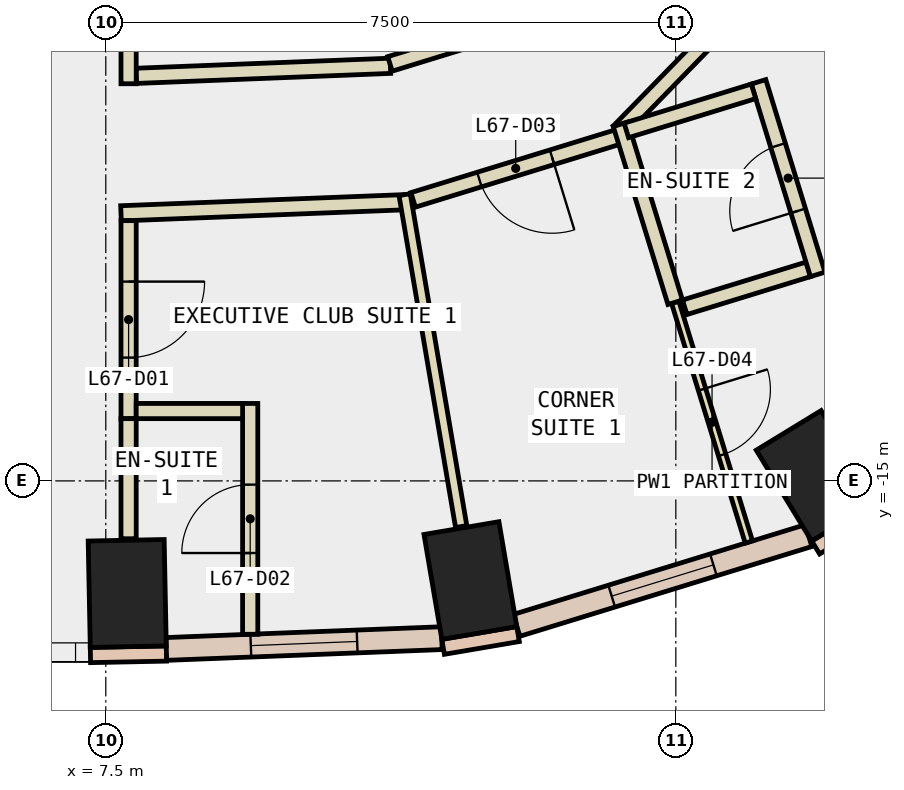
"""IFC4 building model, lengths in metres.
Left out: names, types, materials, properties, quantities, classifications, styles, units other than length and angle.
Written with IfcOpenShell. Run it as: python <this file> out.ifc"""

import sys

from ifc_helpers import new_model, si_unit, direction, frame, frame_2d, origin, origin_2d, place, context, subcontext, project, spatial, rectangle, extrude, element, fill, save


model = new_model("IFC4")
c1 = context("Model", 3, precision=1e-05, world=origin(), true_north=direction((0.0, 1.0)))
c2 = subcontext(c1, "Body", "Model", "MODEL_VIEW")
j1 = project(units=[si_unit("LENGTHUNIT", "METRE"), si_unit("PLANEANGLEUNIT", "RADIAN")], contexts=[c1])
p1 = place(None, origin())
s1 = spatial("IfcSite", under=j1, at=p1, CompositionType="ELEMENT")
p2 = place(p1, origin())
s2 = spatial("IfcBuilding", under=s1, at=p2, CompositionType="ELEMENT")
p3 = place(p2, frame((0.0, 0.0, 290.0)))
s3 = spatial("IfcBuildingStorey", under=s2, at=p3, CompositionType="ELEMENT", Elevation=290.0)
for number, where, z_axis, x_axis in (
    (1, (7.782, -16.481, -0.34), (0.0, 0.0, 1.0), (1.0, 0.02, 0.0)),
    (2, (12.297, -16.311, -0.34), (0.0, 0.0, 1.0), (0.986, 0.168, 0.0)),
    (3, (16.85, -14.933, -0.34), (0.0, 0.0, 1.0), (0.854, 0.521, 0.0)),
):
    element("IfcColumn", number, at=place(p3, frame(where, z_axis=z_axis, x_axis=x_axis)), inside=s3, PredefinedType="COLUMN", context=c2, shape_type="SweptSolid", body=[
        extrude(rectangle(XDim=1.0, YDim=1.4, at=origin_2d()), origin(), (0.0, 0.0, 1.0), 3.6),
    ])
for number, where, z_axis, x_axis in (
    (4, (7.298, -17.291, 0.0), (0.0, 0.0, 1.0), (1.0, 0.02, 0.0)),
    (5, (11.938, -17.183, 0.0), (0.0, 0.0, 1.0), (0.986, 0.168, 0.0)),
):
    element("IfcWall", number, at=place(p3, frame(where, z_axis=z_axis, x_axis=x_axis)), inside=s3, PredefinedType="STANDARD", context=c2, shape_type="SweptSolid", body=[
        extrude(rectangle(XDim=1.0, YDim=0.2, at=frame_2d((0.5, 0.0))), origin(), (0.0, 0.0, 1.0), 3.26),
    ])
p4 = place(p3, frame((16.84, -15.876, 0.0), z_axis=(0.0, 0.0, 1.0), x_axis=(0.853679739553, 0.520798331677, 0.0)))
e6 = element("IfcWall", 6, at=p4, inside=s3, PredefinedType="STANDARD", context=c2, shape_type="SweptSolid", body=[
    extrude(rectangle(XDim=1.0, YDim=0.2, at=frame_2d((0.5, 0.0))), origin(), (0.0, 0.0, 1.0), 3.26),
])
p5 = place(p3, frame((8.296, -17.211, 0.0), z_axis=(0.0, 0.0, 1.0), x_axis=(0.999234893779, 0.039110446866, 0.0)))
e7 = element("IfcWall", 7, at=p5, inside=s3, PredefinedType="STANDARD", context=c2, shape_type="SweptSolid", body=[
    extrude(rectangle(XDim=3.627, YDim=0.3, at=frame_2d((1.813, 0.0))), origin(), (0.0, 0.0, 1.0), 3.26),
])
p6 = place(p5, frame((1.113, 0.0, 0.9)))
e8 = element("IfcOpeningElement", 8, at=p6, cuts=e7, PredefinedType="OPENING", context=c2, shape_type="SweptSolid", body=[
    extrude(rectangle(XDim=1.4, YDim=2.0, at=frame_2d((0.7, 1.0))), frame((0.0, 0.16, 0.0), z_axis=(0.0, -1.0, 0.0), x_axis=(1.0, 0.0, 0.0)), (0.0, 0.0, 1.0), 0.32),
])
p7 = place(p3, frame((12.904, -16.901, 0.0), z_axis=(0.0, 0.0, 1.0), x_axis=(0.955866957005, 0.293799864716, 0.0)))
e9 = element("IfcWall", 9, at=p7, inside=s3, PredefinedType="STANDARD", context=c2, shape_type="SweptSolid", body=[
    extrude(rectangle(XDim=4.02, YDim=0.3, at=frame_2d((2.01, 0.0))), origin(), (0.0, 0.0, 1.0), 3.26),
])
p8 = place(p7, frame((1.31, 0.0, 0.9)))
e10 = element("IfcOpeningElement", 10, at=p8, cuts=e9, PredefinedType="OPENING", context=c2, shape_type="SweptSolid", body=[
    extrude(rectangle(XDim=1.4, YDim=2.0, at=frame_2d((0.7, 1.0))), frame((0.0, 0.16, 0.0), z_axis=(0.0, -1.0, 0.0), x_axis=(1.0, 0.0, 0.0)), (0.0, 0.0, 1.0), 0.32),
])
p9 = place(p3, frame((7.9, -9.671, 0.0), z_axis=(0.0, 0.0, 1.0), x_axis=(0.999223751627, 0.039394088186, 0.0)))
e11 = element("IfcWall", 11, at=p9, inside=s3, PredefinedType="PARTITIONING", context=c2, shape_type="SweptSolid", body=[
    extrude(rectangle(XDim=3.347, YDim=0.2, at=frame_2d((1.673, 0.0))), origin(), (0.0, 0.0, 1.0), 3.26),
])
p10 = place(p3, frame((11.239, -9.514, 0.0), z_axis=(0.0, 0.0, 1.0), x_axis=(0.955838469047, 0.293892533234, 0.0)))
e12 = element("IfcWall", 12, at=p10, inside=s3, PredefinedType="PARTITIONING", context=c2, shape_type="SweptSolid", body=[
    extrude(rectangle(XDim=2.13, YDim=0.2, at=frame_2d((1.065, 0.0))), origin(), (0.0, 0.0, 1.0), 3.26),
])
p11 = place(p3, frame((11.474, -11.332, 0.0), z_axis=(0.0, 0.0, 1.0), x_axis=(-0.999232546126, -0.039170381199, 0.0)))
e13 = element("IfcWall", 13, at=p11, inside=s3, PredefinedType="PARTITIONING", context=c2, shape_type="SweptSolid", body=[
    extrude(rectangle(XDim=3.777, YDim=0.2, at=frame_2d((1.889, 0.0))), origin(), (0.0, 0.0, 1.0), 3.26),
])
p12 = place(p3, frame((14.243, -10.474, 0.0), z_axis=(0.0, 0.0, 1.0), x_axis=(-0.955937788993, -0.293569316475, 0.0)))
e14 = element("IfcWall", 14, at=p12, inside=s3, PredefinedType="PARTITIONING", context=c2, shape_type="SweptSolid", body=[
    extrude(rectangle(XDim=2.823, YDim=0.2, at=frame_2d((1.412, 0.0))), origin(), (0.0, 0.0, 1.0), 3.26),
])
p13 = place(p12, frame((0.912, 0.0, 0.0)))
e15 = element("IfcOpeningElement", 15, at=p13, cuts=e14, PredefinedType="OPENING", context=c2, shape_type="SweptSolid", body=[
    extrude(rectangle(XDim=1.0, YDim=2.1, at=frame_2d((0.5, 1.05))), frame((0.0, 0.11, 0.0), z_axis=(0.0, -1.0, 0.0), x_axis=(1.0, 0.0, 0.0)), (0.0, 0.0, 1.0), 0.22),
])
p14 = place(p3, frame((15.535, -9.081, 0.0), z_axis=(0.0, 0.0, 1.0), x_axis=(-0.698342132704, -0.715764113162, 0.0)))
e16 = element("IfcWall", 16, at=p14, inside=s3, PredefinedType="PARTITIONING", context=c2, shape_type="SweptSolid", body=[
    extrude(rectangle(XDim=1.836, YDim=0.2, at=frame_2d((0.918, 0.0))), origin(), (0.0, 0.0, 1.0), 3.26),
])
p15 = place(p3, frame((7.8, -5.899, 0.0), z_axis=(0.0, 0.0, 1.0), x_axis=(0.0, -1.0, 0.0)))
e17 = element("IfcWall", 17, at=p15, inside=s3, PredefinedType="PARTITIONING", context=c2, shape_type="SweptSolid", body=[
    extrude(rectangle(XDim=3.876, YDim=0.2, at=frame_2d((1.938, 0.0))), origin(), (0.0, 0.0, 1.0), 3.26),
])
p16 = place(p3, frame((7.8, -11.576, 0.0), z_axis=(0.0, 0.0, 1.0), x_axis=(0.0, -1.0, 0.0)))
e18 = element("IfcWall", 18, at=p16, inside=s3, PredefinedType="PARTITIONING", context=c2, shape_type="SweptSolid", body=[
    extrude(rectangle(XDim=2.605, YDim=0.2, at=frame_2d((1.302, 0.0))), origin(), (0.0, 0.0, 1.0), 3.26),
])
p17 = place(p16, frame((0.802, 0.0, 0.0)))
e19 = element("IfcOpeningElement", 19, at=p17, cuts=e18, PredefinedType="OPENING", context=c2, shape_type="SweptSolid", body=[
    extrude(rectangle(XDim=1.0, YDim=2.1, at=frame_2d((0.5, 1.05))), frame((0.0, 0.11, 0.0), z_axis=(0.0, -1.0, 0.0), x_axis=(1.0, 0.0, 0.0)), (0.0, 0.0, 1.0), 0.22),
])
p18 = place(p3, frame((7.8, -14.181, 0.0), z_axis=(0.0, 0.0, 1.0), x_axis=(0.0, -1.0, 0.0)))
e20 = element("IfcWall", 20, at=p18, inside=s3, PredefinedType="PARTITIONING", context=c2, shape_type="SweptSolid", body=[
    extrude(rectangle(XDim=1.58, YDim=0.2, at=frame_2d((0.79, 0.0))), origin(), (0.0, 0.0, 1.0), 3.26),
])
p19 = place(p3, frame((9.4, -17.018, 0.0), z_axis=(0.0, 0.0, 1.0), x_axis=(0.0, 1.0, 0.0)))
e21 = element("IfcWall", 21, at=p19, inside=s3, PredefinedType="PARTITIONING", context=c2, shape_type="SweptSolid", body=[
    extrude(rectangle(XDim=3.037, YDim=0.2, at=frame_2d((1.519, 0.0))), origin(), (0.0, 0.0, 1.0), 3.26),
])
p20 = place(p19, frame((1.069, 0.0, 0.0)))
e22 = element("IfcOpeningElement", 22, at=p20, cuts=e21, PredefinedType="OPENING", context=c2, shape_type="SweptSolid", body=[
    extrude(rectangle(XDim=0.9, YDim=2.1, at=frame_2d((0.45, 1.05))), frame((0.0, 0.11, 0.0), z_axis=(0.0, -1.0, 0.0), x_axis=(1.0, 0.0, 0.0)), (0.0, 0.0, 1.0), 0.22),
])
p21 = place(p3, frame((9.3, -14.081, 0.0), z_axis=(0.0, 0.0, 1.0), x_axis=(-1.0, 0.0, 0.0)))
e23 = element("IfcWall", 23, at=p21, inside=s3, PredefinedType="PARTITIONING", context=c2, shape_type="SweptSolid", body=[
    extrude(rectangle(XDim=1.4, YDim=0.2, at=frame_2d((0.7, 0.0))), origin(), (0.0, 0.0, 1.0), 3.26),
])
p22 = place(p3, frame((11.432, -11.234, 0.0), z_axis=(0.0, 0.0, 1.0), x_axis=(0.16797255243, -0.98579167253, 0.0)))
e24 = element("IfcWall", 24, at=p22, inside=s3, PredefinedType="PARTITIONING", context=c2, shape_type="SweptSolid", body=[
    extrude(rectangle(XDim=4.43, YDim=0.15, at=frame_2d((2.215, 0.0))), origin(), (0.0, 0.0, 1.0), 3.26),
])
p23 = place(p3, frame((14.992, -12.65, 0.0), z_axis=(0.0, 0.0, 1.0), x_axis=(0.293675064948, -0.955905307145, 0.0)))
e25 = element("IfcWall", 25, at=p23, inside=s3, PredefinedType="PARTITIONING", context=c2, shape_type="SweptSolid", body=[
    extrude(rectangle(XDim=3.3, YDim=0.1, at=frame_2d((1.65, 0.0))), origin(), (0.0, 0.0, 1.0), 3.26),
])
p24 = place(p23, frame((1.2, 0.0, 0.0)))
e26 = element("IfcOpeningElement", 26, at=p24, cuts=e25, PredefinedType="OPENING", context=c2, shape_type="SweptSolid", body=[
    extrude(rectangle(XDim=0.9, YDim=2.1, at=frame_2d((0.45, 1.05))), frame((0.0, 0.06, 0.0), z_axis=(0.0, -1.0, 0.0), x_axis=(1.0, 0.0, 0.0)), (0.0, 0.0, 1.0), 0.12),
])
p25 = place(p3, frame((14.272, -10.308, 0.0), z_axis=(0.0, 0.0, 1.0), x_axis=(0.293868765171, -0.955845776711, 0.0)))
e27 = element("IfcWall", 27, at=p25, inside=s3, PredefinedType="PARTITIONING", context=c2, shape_type="SweptSolid", body=[
    extrude(rectangle(XDim=2.45, YDim=0.2, at=frame_2d((1.225, 0.0))), origin(), (0.0, 0.0, 1.0), 3.26),
])
p26 = place(p3, frame((15.117, -12.716, 0.0), z_axis=(0.0, 0.0, 1.0), x_axis=(0.955940341053, 0.293561006177, 0.0)))
e28 = element("IfcWall", 28, at=p26, inside=s3, PredefinedType="PARTITIONING", context=c2, shape_type="SweptSolid", body=[
    extrude(rectangle(XDim=1.7, YDim=0.2, at=frame_2d((0.85, 0.0))), origin(), (0.0, 0.0, 1.0), 3.26),
])
p27 = place(p3, frame((16.867, -12.283, 0.0), z_axis=(0.0, 0.0, 1.0), x_axis=(-0.29397579302, 0.955812865114, 0.0)))
e29 = element("IfcWall", 29, at=p27, inside=s3, PredefinedType="PARTITIONING", context=c2, shape_type="SweptSolid", body=[
    extrude(rectangle(XDim=2.65, YDim=0.2, at=frame_2d((1.325, 0.0))), origin(), (0.0, 0.0, 1.0), 3.26),
])
p28 = place(p27, frame((0.875, 0.0, 0.0)))
e30 = element("IfcOpeningElement", 30, at=p28, cuts=e29, PredefinedType="OPENING", context=c2, shape_type="SweptSolid", body=[
    extrude(rectangle(XDim=0.9, YDim=2.1, at=frame_2d((0.45, 1.05))), frame((0.0, 0.11, 0.0), z_axis=(0.0, -1.0, 0.0), x_axis=(1.0, 0.0, 0.0)), (0.0, 0.0, 1.0), 0.22),
])
p29 = place(p3, frame((16.022, -9.875, 0.0), z_axis=(0.0, 0.0, 1.0), x_axis=(-0.955908620472, -0.293664279932, 0.0)))
e31 = element("IfcWall", 31, at=p29, inside=s3, PredefinedType="PARTITIONING", context=c2, shape_type="SweptSolid", body=[
    extrude(rectangle(XDim=1.75, YDim=0.2, at=frame_2d((0.875, 0.0))), origin(), (0.0, 0.0, 1.0), 3.26),
])
p30 = place(p6, origin())
e32 = element("IfcWindow", 32, at=p30, inside=s3, PartitioningType="SINGLE_PANEL", PredefinedType="WINDOW", context=c2, shape_type="SweptSolid", body=[
    extrude(rectangle(XDim=1.4, YDim=2.0, at=frame_2d((0.7, 1.0))), frame((0.0, 0.03, 0.0), z_axis=(0.0, -1.0, 0.0), x_axis=(1.0, 0.0, 0.0)), (0.0, 0.0, 1.0), 0.06),
])
fill(e8, e32)
p31 = place(p8, origin())
e33 = element("IfcWindow", 33, at=p31, inside=s3, PartitioningType="SINGLE_PANEL", PredefinedType="WINDOW", context=c2, shape_type="SweptSolid", body=[
    extrude(rectangle(XDim=1.4, YDim=2.0, at=frame_2d((0.7, 1.0))), frame((0.0, 0.03, 0.0), z_axis=(0.0, -1.0, 0.0), x_axis=(1.0, 0.0, 0.0)), (0.0, 0.0, 1.0), 0.06),
])
fill(e10, e33)
p32 = place(p17, origin())
e34 = element("IfcDoor", 34, at=p32, inside=s3, OperationType="SINGLE_SWING_LEFT", PredefinedType="DOOR", context=c2, shape_type="SweptSolid", body=[
    extrude(rectangle(XDim=1.0, YDim=2.1, at=frame_2d((0.5, 1.05))), frame((0.0, 0.025, 0.0), z_axis=(0.0, -1.0, 0.0), x_axis=(1.0, 0.0, 0.0)), (0.0, 0.0, 1.0), 0.05),
])
fill(e19, e34)
p33 = place(p20, origin())
e35 = element("IfcDoor", 35, at=p33, inside=s3, OperationType="SINGLE_SWING_RIGHT", PredefinedType="DOOR", context=c2, shape_type="SweptSolid", body=[
    extrude(rectangle(XDim=0.9, YDim=2.1, at=frame_2d((0.45, 1.05))), frame((0.0, 0.025, 0.0), z_axis=(0.0, -1.0, 0.0), x_axis=(1.0, 0.0, 0.0)), (0.0, 0.0, 1.0), 0.05),
])
fill(e22, e35)
p34 = place(p13, origin())
e36 = element("IfcDoor", 36, at=p34, inside=s3, OperationType="SINGLE_SWING_LEFT", PredefinedType="DOOR", context=c2, shape_type="SweptSolid", body=[
    extrude(rectangle(XDim=1.0, YDim=2.1, at=frame_2d((0.5, 1.05))), frame((0.0, 0.025, 0.0), z_axis=(0.0, -1.0, 0.0), x_axis=(1.0, 0.0, 0.0)), (0.0, 0.0, 1.0), 0.05),
])
fill(e15, e36)
p35 = place(p24, origin())
e37 = element("IfcDoor", 37, at=p35, inside=s3, OperationType="SINGLE_SWING_LEFT", PredefinedType="DOOR", context=c2, shape_type="SweptSolid", body=[
    extrude(rectangle(XDim=0.9, YDim=2.1, at=frame_2d((0.45, 1.05))), frame((0.0, 0.025, 0.0), z_axis=(0.0, -1.0, 0.0), x_axis=(1.0, 0.0, 0.0)), (0.0, 0.0, 1.0), 0.05),
])
fill(e26, e37)
p36 = place(p28, origin())
e38 = element("IfcDoor", 38, at=p36, inside=s3, OperationType="SINGLE_SWING_LEFT", PredefinedType="DOOR", context=c2, shape_type="SweptSolid", body=[
    extrude(rectangle(XDim=0.9, YDim=2.1, at=frame_2d((0.45, 1.05))), frame((0.0, 0.025, 0.0), z_axis=(0.0, -1.0, 0.0), x_axis=(1.0, 0.0, 0.0)), (0.0, 0.0, 1.0), 0.05),
])
fill(e30, e38)
save(model, sys.argv[1])
